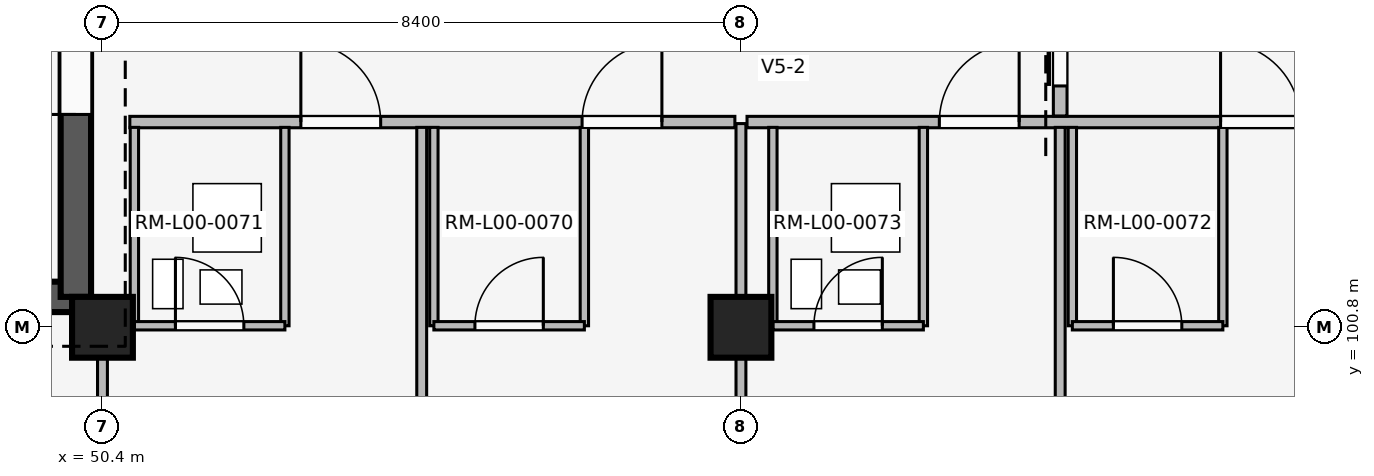
"""IFC4 building model, lengths in metres.
Left out: names, types, materials, properties, quantities, classifications, styles, units other than length and angle.
Written with IfcOpenShell. Run it as: python <this file> out.ifc"""

import sys

from ifc_helpers import new_model, si_unit, direction, frame, frame_2d, origin, origin_2d, place, context, subcontext, project, spatial, rectangle, extrude, element, fill, save


model = new_model("IFC4")
c1 = context("Model", 3, precision=1e-05, world=origin(), true_north=direction((0.0, 1.0)))
c2 = subcontext(c1, "Body", "Model", "MODEL_VIEW")
j1 = project(units=[si_unit("LENGTHUNIT", "METRE"), si_unit("PLANEANGLEUNIT", "RADIAN")], contexts=[c1])
p1 = place(None, origin())
s1 = spatial("IfcSite", under=j1, at=p1, CompositionType="ELEMENT")
p2 = place(p1, origin())
s2 = spatial("IfcBuilding", under=s1, at=p2, CompositionType="ELEMENT")
p3 = place(p2, origin())
s3 = spatial("IfcBuildingStorey", under=s2, at=p3, CompositionType="ELEMENT", Elevation=0.0)
for number, where, z_axis, x_axis in (
    (1, (50.4, 100.8, 0.0), (0.0, 0.0, 1.0), (1.0, 0.0, 0.0)),
    (2, (58.8, 100.8, 0.0), (0.0, 0.0, 1.0), (1.0, 0.0, 0.0)),
):
    element("IfcColumn", number, at=place(p3, frame(where, z_axis=z_axis, x_axis=x_axis)), inside=s3, PredefinedType="COLUMN", context=c2, shape_type="SweptSolid", body=[
        extrude(rectangle(XDim=0.8, YDim=0.8, at=origin_2d()), origin(), (0.0, 0.0, 1.0), 4.8),
    ])
p4 = place(p3, frame((42.55, 101.2, 0.0), z_axis=(0.0, 0.0, 1.0), x_axis=(1.0, 0.0, 0.0)))
e3 = element("IfcWall", 3, at=p4, inside=s3, PredefinedType="SHEAR", context=c2, shape_type="SweptSolid", body=[
    extrude(rectangle(XDim=7.5, YDim=0.4, at=frame_2d((3.75, 0.0))), origin(), (0.0, 0.0, 1.0), 4.52),
])
p5 = place(p4, frame((4.85, 0.0, 0.0)))
e4 = element("IfcOpeningElement", 4, at=p5, cuts=e3, PredefinedType="OPENING", context=c2, shape_type="SweptSolid", body=[
    extrude(rectangle(XDim=1.2, YDim=2.2, at=frame_2d((0.6, 1.1))), frame((0.0, 0.21, 0.0), z_axis=(0.0, -1.0, 0.0), x_axis=(1.0, 0.0, 0.0)), (0.0, 0.0, 1.0), 0.42),
])
p6 = place(p3, frame((50.05, 101.2, 0.0), z_axis=(0.0, 0.0, 1.0), x_axis=(0.0, 1.0, 0.0)))
e5 = element("IfcWall", 5, at=p6, inside=s3, PredefinedType="SHEAR", context=c2, shape_type="SweptSolid", body=[
    extrude(rectangle(XDim=7.55, YDim=0.4, at=frame_2d((3.775, 0.0))), origin(), (0.0, 0.0, 1.0), 4.52),
])
p7 = place(p6, frame((2.4, 0.0, 0.0)))
e6 = element("IfcOpeningElement", 6, at=p7, cuts=e5, PredefinedType="OPENING", context=c2, shape_type="SweptSolid", body=[
    extrude(rectangle(XDim=1.2, YDim=2.2, at=frame_2d((0.6, 1.1))), frame((0.0, 0.21, 0.0), z_axis=(0.0, -1.0, 0.0), x_axis=(1.0, 0.0, 0.0)), (0.0, 0.0, 1.0), 0.42),
])
p8 = place(p3, frame((50.4, 92.54, 0.0), z_axis=(0.0, 0.0, 1.0), x_axis=(0.0, 1.0, 0.0)))
e7 = element("IfcWall", 7, at=p8, inside=s3, PredefinedType="PARTITIONING", context=c2, shape_type="SweptSolid", body=[
    extrude(rectangle(XDim=8.21, YDim=0.13, at=frame_2d((4.105, 0.0))), origin(), (0.0, 0.0, 1.0), 3.8),
])
p9 = place(p8, frame((3.64, 0.0, 0.0)))
e8 = element("IfcOpeningElement", 8, at=p9, cuts=e7, PredefinedType="OPENING", context=c2, shape_type="SweptSolid", body=[
    extrude(rectangle(XDim=1.08, YDim=2.15, at=frame_2d((0.54, 1.075))), frame((0.0, 0.075, 0.0), z_axis=(0.0, -1.0, 0.0), x_axis=(1.0, 0.0, 0.0)), (0.0, 0.0, 1.0), 0.15),
])
p10 = place(p3, frame((50.76, 103.5, 0.0), z_axis=(0.0, 0.0, 1.0), x_axis=(1.0, 0.0, 0.0)))
e9 = element("IfcWall", 9, at=p10, inside=s3, PredefinedType="PARTITIONING", context=c2, shape_type="SweptSolid", body=[
    extrude(rectangle(XDim=7.96, YDim=0.15, at=frame_2d((3.98, 0.0))), origin(), (0.0, 0.0, 1.0), 3.8),
])
p11 = place(p10, frame((2.25, 0.0, 0.0)))
e10 = element("IfcOpeningElement", 10, at=p11, cuts=e9, PredefinedType="OPENING", context=c2, shape_type="SweptSolid", body=[
    extrude(rectangle(XDim=1.05, YDim=2.2, at=frame_2d((0.525, 1.1))), frame((0.0, 0.085, 0.0), z_axis=(0.0, -1.0, 0.0), x_axis=(1.0, 0.0, 0.0)), (0.0, 0.0, 1.0), 0.17),
])
p12 = place(p10, frame((5.95, 0.0, 0.0)))
e11 = element("IfcOpeningElement", 11, at=p12, cuts=e9, PredefinedType="OPENING", context=c2, shape_type="SweptSolid", body=[
    extrude(rectangle(XDim=1.05, YDim=2.2, at=frame_2d((0.525, 1.1))), frame((0.0, 0.085, 0.0), z_axis=(0.0, -1.0, 0.0), x_axis=(1.0, 0.0, 0.0)), (0.0, 0.0, 1.0), 0.17),
])
p13 = place(p3, frame((54.6, 92.5, 0.0), z_axis=(0.0, 0.0, 1.0), x_axis=(0.0, 1.0, 0.0)))
e12 = element("IfcWall", 12, at=p13, inside=s3, PredefinedType="PARTITIONING", context=c2, shape_type="SweptSolid", body=[
    extrude(rectangle(XDim=10.93, YDim=0.13, at=frame_2d((5.465, 0.0))), origin(), (0.0, 0.0, 1.0), 3.8),
])
for number, where, z_axis, x_axis in (
    (13, (50.82, 100.82, 0.0), (0.0, 0.0, 1.0), (0.0, 1.0, 0.0)),
    (14, (52.8, 100.82, 0.0), (0.0, 0.0, 1.0), (0.0, 1.0, 0.0)),
):
    element("IfcWall", number, at=place(p3, frame(where, z_axis=z_axis, x_axis=x_axis)), inside=s3, PredefinedType="PARTITIONING", context=c2, shape_type="SweptSolid", body=[
        extrude(rectangle(XDim=2.61, YDim=0.11, at=frame_2d((1.305, 0.0))), origin(), (0.0, 0.0, 1.0), 3.8),
    ])
p14 = place(p3, frame((50.82, 100.82, 0.0), z_axis=(0.0, 0.0, 1.0), x_axis=(1.0, 0.0, 0.0)))
e15 = element("IfcWall", 15, at=p14, inside=s3, PredefinedType="PARTITIONING", context=c2, shape_type="SweptSolid", body=[
    extrude(rectangle(XDim=1.98, YDim=0.11, at=frame_2d((0.99, 0.0))), origin(), (0.0, 0.0, 1.0), 3.8),
])
p15 = place(p14, frame((0.54, 0.0, 0.0)))
e16 = element("IfcOpeningElement", 16, at=p15, cuts=e15, PredefinedType="OPENING", context=c2, shape_type="SweptSolid", body=[
    extrude(rectangle(XDim=0.9, YDim=2.1, at=frame_2d((0.45, 1.05))), frame((0.0, 0.065, 0.0), z_axis=(0.0, -1.0, 0.0), x_axis=(1.0, 0.0, 0.0)), (0.0, 0.0, 1.0), 0.13),
])
for number, where, z_axis, x_axis in (
    (17, (54.76, 100.82, 0.0), (0.0, 0.0, 1.0), (0.0, 1.0, 0.0)),
    (18, (56.74, 100.82, 0.0), (0.0, 0.0, 1.0), (0.0, 1.0, 0.0)),
):
    element("IfcWall", number, at=place(p3, frame(where, z_axis=z_axis, x_axis=x_axis)), inside=s3, PredefinedType="PARTITIONING", context=c2, shape_type="SweptSolid", body=[
        extrude(rectangle(XDim=2.61, YDim=0.11, at=frame_2d((1.305, 0.0))), origin(), (0.0, 0.0, 1.0), 3.8),
    ])
p16 = place(p3, frame((54.76, 100.82, 0.0), z_axis=(0.0, 0.0, 1.0), x_axis=(1.0, 0.0, 0.0)))
e19 = element("IfcWall", 19, at=p16, inside=s3, PredefinedType="PARTITIONING", context=c2, shape_type="SweptSolid", body=[
    extrude(rectangle(XDim=1.98, YDim=0.11, at=frame_2d((0.99, 0.0))), origin(), (0.0, 0.0, 1.0), 3.8),
])
p17 = place(p16, frame((0.54, 0.0, 0.0)))
e20 = element("IfcOpeningElement", 20, at=p17, cuts=e19, PredefinedType="OPENING", context=c2, shape_type="SweptSolid", body=[
    extrude(rectangle(XDim=0.9, YDim=2.1, at=frame_2d((0.45, 1.05))), frame((0.0, 0.065, 0.0), z_axis=(0.0, -1.0, 0.0), x_axis=(1.0, 0.0, 0.0)), (0.0, 0.0, 1.0), 0.13),
])
p18 = place(p3, frame((58.8, 92.54, 0.0), z_axis=(0.0, 0.0, 1.0), x_axis=(0.0, 1.0, 0.0)))
e21 = element("IfcWall", 21, at=p18, inside=s3, PredefinedType="PARTITIONING", context=c2, shape_type="SweptSolid", body=[
    extrude(rectangle(XDim=10.94, YDim=0.13, at=frame_2d((5.47, 0.0))), origin(), (0.0, 0.0, 1.0), 3.8),
])
p19 = place(p3, frame((58.88, 103.5, 0.0), z_axis=(0.0, 0.0, 1.0), x_axis=(1.0, 0.0, 0.0)))
e22 = element("IfcWall", 22, at=p19, inside=s3, PredefinedType="PARTITIONING", context=c2, shape_type="SweptSolid", body=[
    extrude(rectangle(XDim=8.24, YDim=0.15, at=frame_2d((4.12, 0.0))), origin(), (0.0, 0.0, 1.0), 3.8),
])
p20 = place(p19, frame((2.53, 0.0, 0.0)))
e23 = element("IfcOpeningElement", 23, at=p20, cuts=e22, PredefinedType="OPENING", context=c2, shape_type="SweptSolid", body=[
    extrude(rectangle(XDim=1.05, YDim=2.2, at=frame_2d((0.525, 1.1))), frame((0.0, 0.085, 0.0), z_axis=(0.0, -1.0, 0.0), x_axis=(1.0, 0.0, 0.0)), (0.0, 0.0, 1.0), 0.17),
])
p21 = place(p19, frame((6.23, 0.0, 0.0)))
e24 = element("IfcOpeningElement", 24, at=p21, cuts=e22, PredefinedType="OPENING", context=c2, shape_type="SweptSolid", body=[
    extrude(rectangle(XDim=1.05, YDim=2.2, at=frame_2d((0.525, 1.1))), frame((0.0, 0.085, 0.0), z_axis=(0.0, -1.0, 0.0), x_axis=(1.0, 0.0, 0.0)), (0.0, 0.0, 1.0), 0.17),
])
p22 = place(p3, frame((63.0, 92.5, 0.0), z_axis=(0.0, 0.0, 1.0), x_axis=(0.0, 1.0, 0.0)))
e25 = element("IfcWall", 25, at=p22, inside=s3, PredefinedType="PARTITIONING", context=c2, shape_type="SweptSolid", body=[
    extrude(rectangle(XDim=10.93, YDim=0.13, at=frame_2d((5.465, 0.0))), origin(), (0.0, 0.0, 1.0), 3.8),
])
for number, where, z_axis, x_axis in (
    (26, (59.22, 100.82, 0.0), (0.0, 0.0, 1.0), (0.0, 1.0, 0.0)),
    (27, (61.2, 100.82, 0.0), (0.0, 0.0, 1.0), (0.0, 1.0, 0.0)),
):
    element("IfcWall", number, at=place(p3, frame(where, z_axis=z_axis, x_axis=x_axis)), inside=s3, PredefinedType="PARTITIONING", context=c2, shape_type="SweptSolid", body=[
        extrude(rectangle(XDim=2.61, YDim=0.11, at=frame_2d((1.305, 0.0))), origin(), (0.0, 0.0, 1.0), 3.8),
    ])
p23 = place(p3, frame((59.22, 100.82, 0.0), z_axis=(0.0, 0.0, 1.0), x_axis=(1.0, 0.0, 0.0)))
e28 = element("IfcWall", 28, at=p23, inside=s3, PredefinedType="PARTITIONING", context=c2, shape_type="SweptSolid", body=[
    extrude(rectangle(XDim=1.98, YDim=0.11, at=frame_2d((0.99, 0.0))), origin(), (0.0, 0.0, 1.0), 3.8),
])
p24 = place(p23, frame((0.54, 0.0, 0.0)))
e29 = element("IfcOpeningElement", 29, at=p24, cuts=e28, PredefinedType="OPENING", context=c2, shape_type="SweptSolid", body=[
    extrude(rectangle(XDim=0.9, YDim=2.1, at=frame_2d((0.45, 1.05))), frame((0.0, 0.065, 0.0), z_axis=(0.0, -1.0, 0.0), x_axis=(1.0, 0.0, 0.0)), (0.0, 0.0, 1.0), 0.13),
])
for number, where, z_axis, x_axis in (
    (30, (63.16, 100.82, 0.0), (0.0, 0.0, 1.0), (0.0, 1.0, 0.0)),
    (31, (65.14, 100.82, 0.0), (0.0, 0.0, 1.0), (0.0, 1.0, 0.0)),
):
    element("IfcWall", number, at=place(p3, frame(where, z_axis=z_axis, x_axis=x_axis)), inside=s3, PredefinedType="PARTITIONING", context=c2, shape_type="SweptSolid", body=[
        extrude(rectangle(XDim=2.61, YDim=0.11, at=frame_2d((1.305, 0.0))), origin(), (0.0, 0.0, 1.0), 3.8),
    ])
p25 = place(p3, frame((63.16, 100.82, 0.0), z_axis=(0.0, 0.0, 1.0), x_axis=(1.0, 0.0, 0.0)))
e32 = element("IfcWall", 32, at=p25, inside=s3, PredefinedType="PARTITIONING", context=c2, shape_type="SweptSolid", body=[
    extrude(rectangle(XDim=1.98, YDim=0.11, at=frame_2d((0.99, 0.0))), origin(), (0.0, 0.0, 1.0), 3.8),
])
p26 = place(p25, frame((0.54, 0.0, 0.0)))
e33 = element("IfcOpeningElement", 33, at=p26, cuts=e32, PredefinedType="OPENING", context=c2, shape_type="SweptSolid", body=[
    extrude(rectangle(XDim=0.9, YDim=2.1, at=frame_2d((0.45, 1.05))), frame((0.0, 0.065, 0.0), z_axis=(0.0, -1.0, 0.0), x_axis=(1.0, 0.0, 0.0)), (0.0, 0.0, 1.0), 0.13),
])
p27 = place(p3, frame((63.0, 103.58, 0.0), z_axis=(0.0, 0.0, 1.0), x_axis=(0.0, 1.0, 0.0)))
e34 = element("IfcWall", 34, at=p27, inside=s3, PredefinedType="PARTITIONING", context=c2, shape_type="SweptSolid", body=[
    extrude(rectangle(XDim=2.84, YDim=0.18, at=frame_2d((1.42, 0.0))), origin(), (0.0, 0.0, 1.0), 3.8),
])
p28 = place(p27, frame((0.395, 0.0, 0.0)))
e35 = element("IfcOpeningElement", 35, at=p28, cuts=e34, PredefinedType="OPENING", context=c2, shape_type="SweptSolid", body=[
    extrude(rectangle(XDim=2.05, YDim=2.35, at=frame_2d((1.025, 1.175))), frame((0.0, 0.1, 0.0), z_axis=(0.0, -1.0, 0.0), x_axis=(1.0, 0.0, 0.0)), (0.0, 0.0, 1.0), 0.2),
])
p29 = place(p7, origin())
e36 = element("IfcDoor", 36, at=p29, inside=s3, OperationType="SINGLE_SWING_LEFT", PredefinedType="DOOR", context=c2, shape_type="SweptSolid", body=[
    extrude(rectangle(XDim=1.2, YDim=2.2, at=frame_2d((0.6, 1.1))), frame((0.0, 0.025, 0.0), z_axis=(0.0, -1.0, 0.0), x_axis=(1.0, 0.0, 0.0)), (0.0, 0.0, 1.0), 0.05),
])
fill(e6, e36)
p30 = place(p11, origin())
e37 = element("IfcDoor", 37, at=p30, inside=s3, OperationType="SINGLE_SWING_LEFT", PredefinedType="DOOR", context=c2, shape_type="SweptSolid", body=[
    extrude(rectangle(XDim=1.05, YDim=2.2, at=frame_2d((0.525, 1.1))), frame((0.0, 0.025, 0.0), z_axis=(0.0, -1.0, 0.0), x_axis=(1.0, 0.0, 0.0)), (0.0, 0.0, 1.0), 0.05),
])
fill(e10, e37)
p31 = place(p12, origin())
e38 = element("IfcDoor", 38, at=p31, inside=s3, OperationType="SINGLE_SWING_RIGHT", PredefinedType="DOOR", context=c2, shape_type="SweptSolid", body=[
    extrude(rectangle(XDim=1.05, YDim=2.2, at=frame_2d((0.525, 1.1))), frame((0.0, 0.025, 0.0), z_axis=(0.0, -1.0, 0.0), x_axis=(1.0, 0.0, 0.0)), (0.0, 0.0, 1.0), 0.05),
])
fill(e11, e38)
p32 = place(p15, origin())
e39 = element("IfcDoor", 39, at=p32, inside=s3, OperationType="SINGLE_SWING_LEFT", PredefinedType="DOOR", context=c2, shape_type="SweptSolid", body=[
    extrude(rectangle(XDim=0.9, YDim=2.1, at=frame_2d((0.45, 1.05))), frame((0.0, 0.025, 0.0), z_axis=(0.0, -1.0, 0.0), x_axis=(1.0, 0.0, 0.0)), (0.0, 0.0, 1.0), 0.05),
])
fill(e16, e39)
p33 = place(p17, origin())
e40 = element("IfcDoor", 40, at=p33, inside=s3, OperationType="SINGLE_SWING_RIGHT", PredefinedType="DOOR", context=c2, shape_type="SweptSolid", body=[
    extrude(rectangle(XDim=0.9, YDim=2.1, at=frame_2d((0.45, 1.05))), frame((0.0, 0.025, 0.0), z_axis=(0.0, -1.0, 0.0), x_axis=(1.0, 0.0, 0.0)), (0.0, 0.0, 1.0), 0.05),
])
fill(e20, e40)
p34 = place(p20, origin())
e41 = element("IfcDoor", 41, at=p34, inside=s3, OperationType="SINGLE_SWING_RIGHT", PredefinedType="DOOR", context=c2, shape_type="SweptSolid", body=[
    extrude(rectangle(XDim=1.05, YDim=2.2, at=frame_2d((0.525, 1.1))), frame((0.0, 0.025, 0.0), z_axis=(0.0, -1.0, 0.0), x_axis=(1.0, 0.0, 0.0)), (0.0, 0.0, 1.0), 0.05),
])
fill(e23, e41)
p35 = place(p21, origin())
e42 = element("IfcDoor", 42, at=p35, inside=s3, OperationType="SINGLE_SWING_LEFT", PredefinedType="DOOR", context=c2, shape_type="SweptSolid", body=[
    extrude(rectangle(XDim=1.05, YDim=2.2, at=frame_2d((0.525, 1.1))), frame((0.0, 0.025, 0.0), z_axis=(0.0, -1.0, 0.0), x_axis=(1.0, 0.0, 0.0)), (0.0, 0.0, 1.0), 0.05),
])
fill(e24, e42)
p36 = place(p24, origin())
e43 = element("IfcDoor", 43, at=p36, inside=s3, OperationType="SINGLE_SWING_RIGHT", PredefinedType="DOOR", context=c2, shape_type="SweptSolid", body=[
    extrude(rectangle(XDim=0.9, YDim=2.1, at=frame_2d((0.45, 1.05))), frame((0.0, 0.025, 0.0), z_axis=(0.0, -1.0, 0.0), x_axis=(1.0, 0.0, 0.0)), (0.0, 0.0, 1.0), 0.05),
])
fill(e29, e43)
p37 = place(p26, origin())
e44 = element("IfcDoor", 44, at=p37, inside=s3, OperationType="SINGLE_SWING_LEFT", PredefinedType="DOOR", context=c2, shape_type="SweptSolid", body=[
    extrude(rectangle(XDim=0.9, YDim=2.1, at=frame_2d((0.45, 1.05))), frame((0.0, 0.025, 0.0), z_axis=(0.0, -1.0, 0.0), x_axis=(1.0, 0.0, 0.0)), (0.0, 0.0, 1.0), 0.05),
])
fill(e33, e44)
p38 = place(p28, origin())
e45 = element("IfcDoor", 45, at=p38, inside=s3, OperationType="SLIDING_TO_LEFT", PredefinedType="DOOR", context=c2, shape_type="SweptSolid", body=[
    extrude(rectangle(XDim=2.05, YDim=2.35, at=frame_2d((1.025, 1.175))), frame((0.0, 0.025, 0.0), z_axis=(0.0, -1.0, 0.0), x_axis=(1.0, 0.0, 0.0)), (0.0, 0.0, 1.0), 0.05),
])
fill(e35, e45)
save(model, sys.argv[1])
